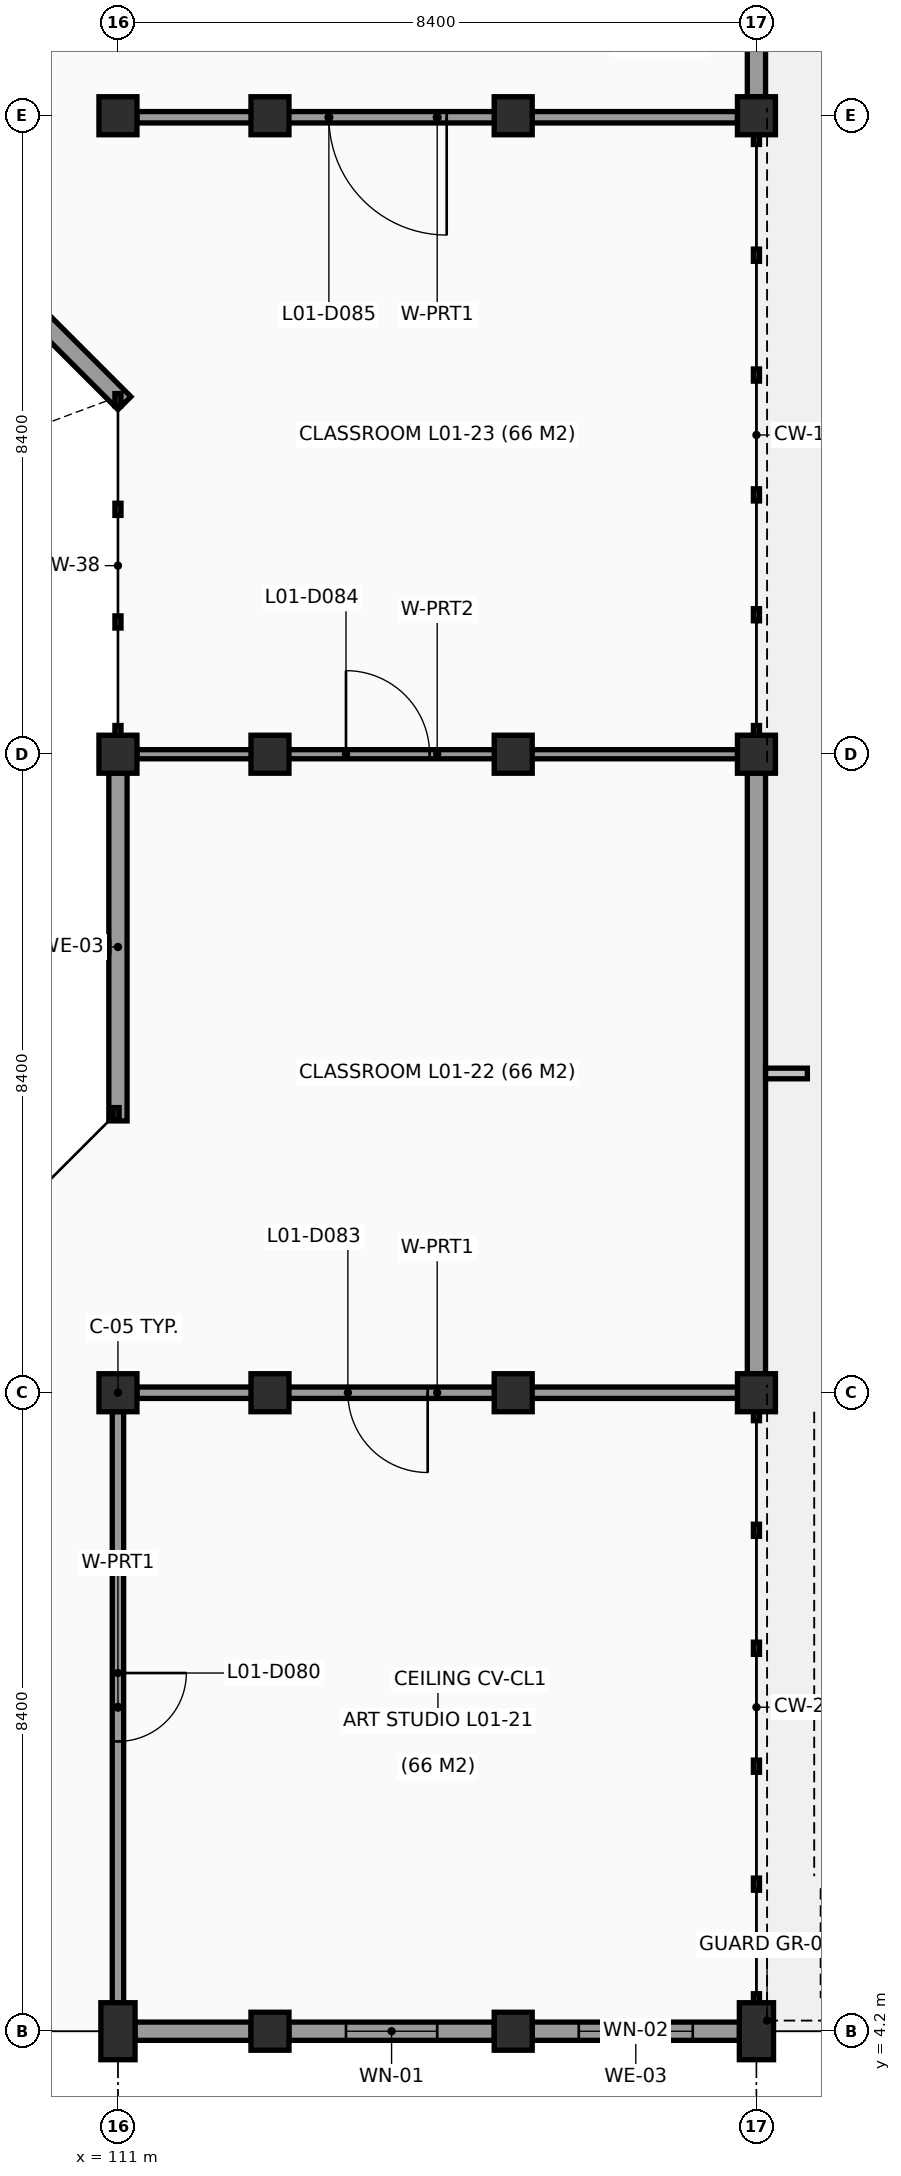
"""IFC4 building model, lengths in metres.
Left out: names, types, materials, properties, quantities, classifications, styles, units other than length and angle.
Written with IfcOpenShell. Run it as: python <this file> out.ifc"""

import sys

from ifc_helpers import new_model, si_unit, direction, frame, frame_2d, origin, origin_2d, place, context, subcontext, project, spatial, rectangle, extrude, element, fill, save


model = new_model("IFC4")
c1 = context("Model", 3, precision=1e-05, world=origin(), true_north=direction((0.0, 1.0)))
c2 = subcontext(c1, "Body", "Model", "MODEL_VIEW")
j1 = project(units=[si_unit("LENGTHUNIT", "METRE"), si_unit("PLANEANGLEUNIT", "RADIAN")], contexts=[c1])
p1 = place(None, origin())
s1 = spatial("IfcSite", under=j1, at=p1, CompositionType="ELEMENT")
p2 = place(p1, origin())
s2 = spatial("IfcBuilding", under=s1, at=p2, CompositionType="ELEMENT")
p3 = place(p2, frame((0.0, 0.0, 4.2)))
s3 = spatial("IfcBuildingStorey", under=s2, at=p3, CompositionType="ELEMENT", Elevation=4.2)
p4 = place(p3, frame((111.0, 4.2, 0.0), z_axis=(0.0, 0.0, 1.0), x_axis=(1.0, 0.0, 0.0)))
e1 = element("IfcColumn", 1, at=p4, inside=s3, PredefinedType="COLUMN", context=c2, shape_type="SweptSolid", body=[
    extrude(rectangle(XDim=0.45, YDim=0.75, at=origin_2d()), origin(), (0.0, 0.0, 1.0), 3.38),
])
for number, where, z_axis, x_axis in (
    (2, (111.0, 12.6, 0.0), (0.0, 0.0, 1.0), (1.0, 0.0, 0.0)),
    (3, (111.0, 21.0, 0.0), (0.0, 0.0, 1.0), (1.0, 0.0, 0.0)),
):
    element("IfcColumn", number, at=place(p3, frame(where, z_axis=z_axis, x_axis=x_axis)), inside=s3, PredefinedType="COLUMN", context=c2, shape_type="SweptSolid", body=[
        extrude(rectangle(XDim=0.5, YDim=0.5, at=origin_2d()), origin(), (0.0, 0.0, 1.0), 3.32),
    ])
p5 = place(p3, frame((111.0, 29.4, 0.0), z_axis=(0.0, 0.0, 1.0), x_axis=(1.0, 0.0, 0.0)))
e4 = element("IfcColumn", 4, at=p5, inside=s3, PredefinedType="COLUMN", context=c2, shape_type="SweptSolid", body=[
    extrude(rectangle(XDim=0.5, YDim=0.5, at=origin_2d()), origin(), (0.0, 0.0, 1.0), 3.6),
])
p6 = place(p3, frame((119.4, 4.2, 0.0), z_axis=(0.0, 0.0, 1.0), x_axis=(1.0, 0.0, 0.0)))
e5 = element("IfcColumn", 5, at=p6, inside=s3, PredefinedType="COLUMN", context=c2, shape_type="SweptSolid", body=[
    extrude(rectangle(XDim=0.45, YDim=0.75, at=origin_2d()), origin(), (0.0, 0.0, 1.0), 3.38),
])
for number, where, z_axis, x_axis in (
    (6, (119.4, 12.6, 0.0), (0.0, 0.0, 1.0), (1.0, 0.0, 0.0)),
    (7, (119.4, 21.0, 0.0), (0.0, 0.0, 1.0), (1.0, 0.0, 0.0)),
):
    element("IfcColumn", number, at=place(p3, frame(where, z_axis=z_axis, x_axis=x_axis)), inside=s3, PredefinedType="COLUMN", context=c2, shape_type="SweptSolid", body=[
        extrude(rectangle(XDim=0.5, YDim=0.5, at=origin_2d()), origin(), (0.0, 0.0, 1.0), 3.32),
    ])
p7 = place(p3, frame((119.4, 29.4, 0.0), z_axis=(0.0, 0.0, 1.0), x_axis=(1.0, 0.0, 0.0)))
e8 = element("IfcColumn", 8, at=p7, inside=s3, PredefinedType="COLUMN", context=c2, shape_type="SweptSolid", body=[
    extrude(rectangle(XDim=0.5, YDim=0.5, at=origin_2d()), origin(), (0.0, 0.0, 1.0), 3.6),
])
for number, where, z_axis, x_axis in (
    (9, (116.2, 4.2, 0.0), (0.0, 0.0, 1.0), (1.0, 0.0, 0.0)),
    (10, (116.2, 12.6, 0.0), (0.0, 0.0, 1.0), (1.0, 0.0, 0.0)),
    (11, (116.2, 21.0, 0.0), (0.0, 0.0, 1.0), (1.0, 0.0, 0.0)),
):
    element("IfcColumn", number, at=place(p3, frame(where, z_axis=z_axis, x_axis=x_axis)), inside=s3, PredefinedType="COLUMN", context=c2, shape_type="SweptSolid", body=[
        extrude(rectangle(XDim=0.5, YDim=0.5, at=origin_2d()), origin(), (0.0, 0.0, 1.0), 3.28),
    ])
p8 = place(p3, frame((116.2, 29.4, 0.0), z_axis=(0.0, 0.0, 1.0), x_axis=(1.0, 0.0, 0.0)))
e12 = element("IfcColumn", 12, at=p8, inside=s3, PredefinedType="COLUMN", context=c2, shape_type="SweptSolid", body=[
    extrude(rectangle(XDim=0.5, YDim=0.5, at=origin_2d()), origin(), (0.0, 0.0, 1.0), 3.6),
])
for number, where, z_axis, x_axis in (
    (13, (113.0, 4.2, 0.0), (0.0, 0.0, 1.0), (1.0, 0.0, 0.0)),
    (14, (113.0, 12.6, 0.0), (0.0, 0.0, 1.0), (1.0, 0.0, 0.0)),
    (15, (113.0, 21.0, 0.0), (0.0, 0.0, 1.0), (1.0, 0.0, 0.0)),
):
    element("IfcColumn", number, at=place(p3, frame(where, z_axis=z_axis, x_axis=x_axis)), inside=s3, PredefinedType="COLUMN", context=c2, shape_type="SweptSolid", body=[
        extrude(rectangle(XDim=0.5, YDim=0.5, at=origin_2d()), origin(), (0.0, 0.0, 1.0), 3.28),
    ])
p9 = place(p3, frame((113.0, 29.4, 0.0), z_axis=(0.0, 0.0, 1.0), x_axis=(1.0, 0.0, 0.0)))
e16 = element("IfcColumn", 16, at=p9, inside=s3, PredefinedType="COLUMN", context=c2, shape_type="SweptSolid", body=[
    extrude(rectangle(XDim=0.5, YDim=0.5, at=origin_2d()), origin(), (0.0, 0.0, 1.0), 3.6),
])
p10 = place(p3, frame((119.4, 32.077, 0.0), z_axis=(0.0, 0.0, 1.0), x_axis=(0.0, -1.0, 0.0)))
e17 = element("IfcWall", 17, at=p10, inside=s3, PredefinedType="SOLIDWALL", context=c2, shape_type="SweptSolid", body=[
    extrude(rectangle(XDim=2.429, YDim=0.24, at=frame_2d((1.214, 0.0))), origin(), (0.0, 0.0, 1.0), 2.58),
])
p11 = place(p3, frame((119.4, 20.752, 0.0), z_axis=(0.0, 0.0, 1.0), x_axis=(0.0, -1.0, 0.0)))
e18 = element("IfcWall", 18, at=p11, inside=s3, PredefinedType="SOLIDWALL", context=c2, shape_type="SweptSolid", body=[
    extrude(rectangle(XDim=7.904, YDim=0.24, at=frame_2d((3.952, 0.0))), origin(), (0.0, 0.0, 1.0), 2.58),
])
p12 = place(p3, frame((119.177, 4.2, 0.0), z_axis=(0.0, 0.0, 1.0), x_axis=(-1.0, 0.0, 0.0)))
e19 = element("IfcWall", 19, at=p12, inside=s3, PredefinedType="SOLIDWALL", context=c2, shape_type="SweptSolid", body=[
    extrude(rectangle(XDim=2.729, YDim=0.24, at=frame_2d((1.365, 0.0))), origin(), (0.0, 0.0, 1.0), 2.83),
])
p13 = place(p12, frame((0.615, 0.0, 0.95)))
e20 = element("IfcOpeningElement", 20, at=p13, cuts=e19, PredefinedType="OPENING", context=c2, shape_type="SweptSolid", body=[
    extrude(rectangle(XDim=1.5, YDim=1.2, at=frame_2d((0.75, 0.6))), frame((0.0, 0.13, 0.0), z_axis=(0.0, -1.0, 0.0), x_axis=(1.0, 0.0, 0.0)), (0.0, 0.0, 1.0), 0.26),
])
p14 = place(p3, frame((115.952, 4.2, 0.0), z_axis=(0.0, 0.0, 1.0), x_axis=(-1.0, 0.0, 0.0)))
e21 = element("IfcWall", 21, at=p14, inside=s3, PredefinedType="SOLIDWALL", context=c2, shape_type="SweptSolid", body=[
    extrude(rectangle(XDim=2.704, YDim=0.24, at=frame_2d((1.352, 0.0))), origin(), (0.0, 0.0, 1.0), 2.83),
])
p15 = place(p14, frame((0.752, 0.0, 0.95)))
e22 = element("IfcOpeningElement", 22, at=p15, cuts=e21, PredefinedType="OPENING", context=c2, shape_type="SweptSolid", body=[
    extrude(rectangle(XDim=1.2, YDim=1.2, at=frame_2d((0.6, 0.6))), frame((0.0, 0.13, 0.0), z_axis=(0.0, -1.0, 0.0), x_axis=(1.0, 0.0, 0.0)), (0.0, 0.0, 1.0), 0.26),
])
p16 = place(p3, frame((112.752, 4.2, 0.0), z_axis=(0.0, 0.0, 1.0), x_axis=(-1.0, 0.0, 0.0)))
e23 = element("IfcWall", 23, at=p16, inside=s3, PredefinedType="SOLIDWALL", context=c2, shape_type="SweptSolid", body=[
    extrude(rectangle(XDim=1.529, YDim=0.24, at=frame_2d((0.765, 0.0))), origin(), (0.0, 0.0, 1.0), 2.83),
])
p17 = place(p3, frame((111.0, 16.176, 0.0), z_axis=(0.0, 0.0, 1.0), x_axis=(0.0, 1.0, 0.0)))
e24 = element("IfcWall", 24, at=p17, inside=s3, PredefinedType="SOLIDWALL", context=c2, shape_type="SweptSolid", body=[
    extrude(rectangle(XDim=4.576, YDim=0.24, at=frame_2d((2.288, 0.0))), origin(), (0.0, 0.0, 1.0), 2.58),
])
p18 = place(p3, frame((111.085, 25.619, 0.0), z_axis=(0.0, 0.0, 1.0), x_axis=(-0.707131732466, 0.707081829027, 0.0)))
e25 = element("IfcWall", 25, at=p18, inside=s3, PredefinedType="SOLIDWALL", context=c2, shape_type="SweptSolid", body=[
    extrude(rectangle(XDim=4.892, YDim=0.24, at=frame_2d((2.446, 0.0))), origin(), (0.0, 0.0, 1.0), 2.58),
])
p19 = place(p3, frame((111.0, 12.352, 0.0), z_axis=(0.0, 0.0, 1.0), x_axis=(0.0, -1.0, 0.0)))
e26 = element("IfcWall", 26, at=p19, inside=s3, PredefinedType="PARTITIONING", context=c2, shape_type="SweptSolid", body=[
    extrude(rectangle(XDim=7.779, YDim=0.15, at=frame_2d((3.89, 0.0))), origin(), (0.0, 0.0, 1.0), 2.68),
])
p20 = place(p19, frame((3.439, 0.0, 0.0)))
e27 = element("IfcOpeningElement", 27, at=p20, cuts=e26, PredefinedType="OPENING", context=c2, shape_type="SweptSolid", body=[
    extrude(rectangle(XDim=0.9, YDim=2.05, at=frame_2d((0.45, 1.025))), frame((0.0, 0.085, 0.0), z_axis=(0.0, -1.0, 0.0), x_axis=(1.0, 0.0, 0.0)), (0.0, 0.0, 1.0), 0.17),
])
p21 = place(p3, frame((111.248, 12.6, 0.0), z_axis=(0.0, 0.0, 1.0), x_axis=(1.0, 0.0, 0.0)))
e28 = element("IfcWall", 28, at=p21, inside=s3, PredefinedType="PARTITIONING", context=c2, shape_type="SweptSolid", body=[
    extrude(rectangle(XDim=7.904, YDim=0.15, at=frame_2d((3.952, 0.0))), origin(), (0.0, 0.0, 1.0), 2.89),
])
p22 = place(p21, frame((2.777, 0.0, 0.0)))
e29 = element("IfcOpeningElement", 29, at=p22, cuts=e28, PredefinedType="OPENING", context=c2, shape_type="SweptSolid", body=[
    extrude(rectangle(XDim=1.05, YDim=2.15, at=frame_2d((0.525, 1.075))), frame((0.0, 0.085, 0.0), z_axis=(0.0, -1.0, 0.0), x_axis=(1.0, 0.0, 0.0)), (0.0, 0.0, 1.0), 0.17),
])
p23 = place(p3, frame((111.248, 21.0, 0.0), z_axis=(0.0, 0.0, 1.0), x_axis=(1.0, 0.0, 0.0)))
e30 = element("IfcWall", 30, at=p23, inside=s3, PredefinedType="PARTITIONING", context=c2, shape_type="SweptSolid", body=[
    extrude(rectangle(XDim=7.904, YDim=0.12, at=frame_2d((3.952, 0.0))), origin(), (0.0, 0.0, 1.0), 2.53),
])
p24 = place(p23, frame((2.752, 0.0, 0.0)))
e31 = element("IfcOpeningElement", 31, at=p24, cuts=e30, PredefinedType="OPENING", context=c2, shape_type="SweptSolid", body=[
    extrude(rectangle(XDim=1.1, YDim=2.1, at=frame_2d((0.55, 1.05))), frame((0.0, 0.07, 0.0), z_axis=(0.0, -1.0, 0.0), x_axis=(1.0, 0.0, 0.0)), (0.0, 0.0, 1.0), 0.14),
])
p25 = place(p3, frame((111.248, 29.38, 0.0), z_axis=(0.0, 0.0, 1.0), x_axis=(1.0, 0.0, 0.0)))
e32 = element("IfcWall", 32, at=p25, inside=s3, PredefinedType="PARTITIONING", context=c2, shape_type="SweptSolid", body=[
    extrude(rectangle(XDim=7.904, YDim=0.15, at=frame_2d((3.952, 0.0))), origin(), (0.0, 0.0, 1.0), 2.63),
])
p26 = place(p25, frame((2.527, 0.0, 0.0)))
e33 = element("IfcOpeningElement", 33, at=p26, cuts=e32, PredefinedType="OPENING", context=c2, shape_type="SweptSolid", body=[
    extrude(rectangle(XDim=1.55, YDim=2.2, at=frame_2d((0.775, 1.1))), frame((0.0, 0.085, 0.0), z_axis=(0.0, -1.0, 0.0), x_axis=(1.0, 0.0, 0.0)), (0.0, 0.0, 1.0), 0.17),
])
p27 = place(p13, origin())
e34 = element("IfcWindow", 34, at=p27, inside=s3, PartitioningType="SINGLE_PANEL", PredefinedType="WINDOW", context=c2, shape_type="SweptSolid", body=[
    extrude(rectangle(XDim=1.5, YDim=1.2, at=frame_2d((0.75, 0.6))), frame((0.0, 0.03, 0.0), z_axis=(0.0, -1.0, 0.0), x_axis=(1.0, 0.0, 0.0)), (0.0, 0.0, 1.0), 0.06),
])
fill(e20, e34)
p28 = place(p15, origin())
e35 = element("IfcWindow", 35, at=p28, inside=s3, PartitioningType="SINGLE_PANEL", PredefinedType="WINDOW", context=c2, shape_type="SweptSolid", body=[
    extrude(rectangle(XDim=1.2, YDim=1.2, at=frame_2d((0.6, 0.6))), frame((0.0, 0.03, 0.0), z_axis=(0.0, -1.0, 0.0), x_axis=(1.0, 0.0, 0.0)), (0.0, 0.0, 1.0), 0.06),
])
fill(e22, e35)
p29 = place(p20, origin())
e36 = element("IfcDoor", 36, at=p29, inside=s3, OperationType="SINGLE_SWING_LEFT", PredefinedType="DOOR", context=c2, shape_type="SweptSolid", body=[
    extrude(rectangle(XDim=0.9, YDim=2.05, at=frame_2d((0.45, 1.025))), frame((0.0, 0.025, 0.0), z_axis=(0.0, -1.0, 0.0), x_axis=(1.0, 0.0, 0.0)), (0.0, 0.0, 1.0), 0.05),
])
fill(e27, e36)
p30 = place(p22, origin())
e37 = element("IfcDoor", 37, at=p30, inside=s3, OperationType="SINGLE_SWING_RIGHT", PredefinedType="DOOR", context=c2, shape_type="SweptSolid", body=[
    extrude(rectangle(XDim=1.05, YDim=2.15, at=frame_2d((0.525, 1.075))), frame((0.0, 0.025, 0.0), z_axis=(0.0, -1.0, 0.0), x_axis=(1.0, 0.0, 0.0)), (0.0, 0.0, 1.0), 0.05),
])
fill(e29, e37)
p31 = place(p24, origin())
e38 = element("IfcDoor", 38, at=p31, inside=s3, OperationType="SINGLE_SWING_LEFT", PredefinedType="DOOR", context=c2, shape_type="SweptSolid", body=[
    extrude(rectangle(XDim=1.1, YDim=2.1, at=frame_2d((0.55, 1.05))), frame((0.0, 0.025, 0.0), z_axis=(0.0, -1.0, 0.0), x_axis=(1.0, 0.0, 0.0)), (0.0, 0.0, 1.0), 0.05),
])
fill(e31, e38)
p32 = place(p26, origin())
e39 = element("IfcDoor", 39, at=p32, inside=s3, OperationType="DOUBLE_DOOR_SINGLE_SWING", PredefinedType="DOOR", context=c2, shape_type="SweptSolid", body=[
    extrude(rectangle(XDim=1.55, YDim=2.2, at=frame_2d((0.775, 1.1))), frame((0.0, 0.025, 0.0), z_axis=(0.0, -1.0, 0.0), x_axis=(1.0, 0.0, 0.0)), (0.0, 0.0, 1.0), 0.05),
])
fill(e33, e39)
save(model, sys.argv[1])
